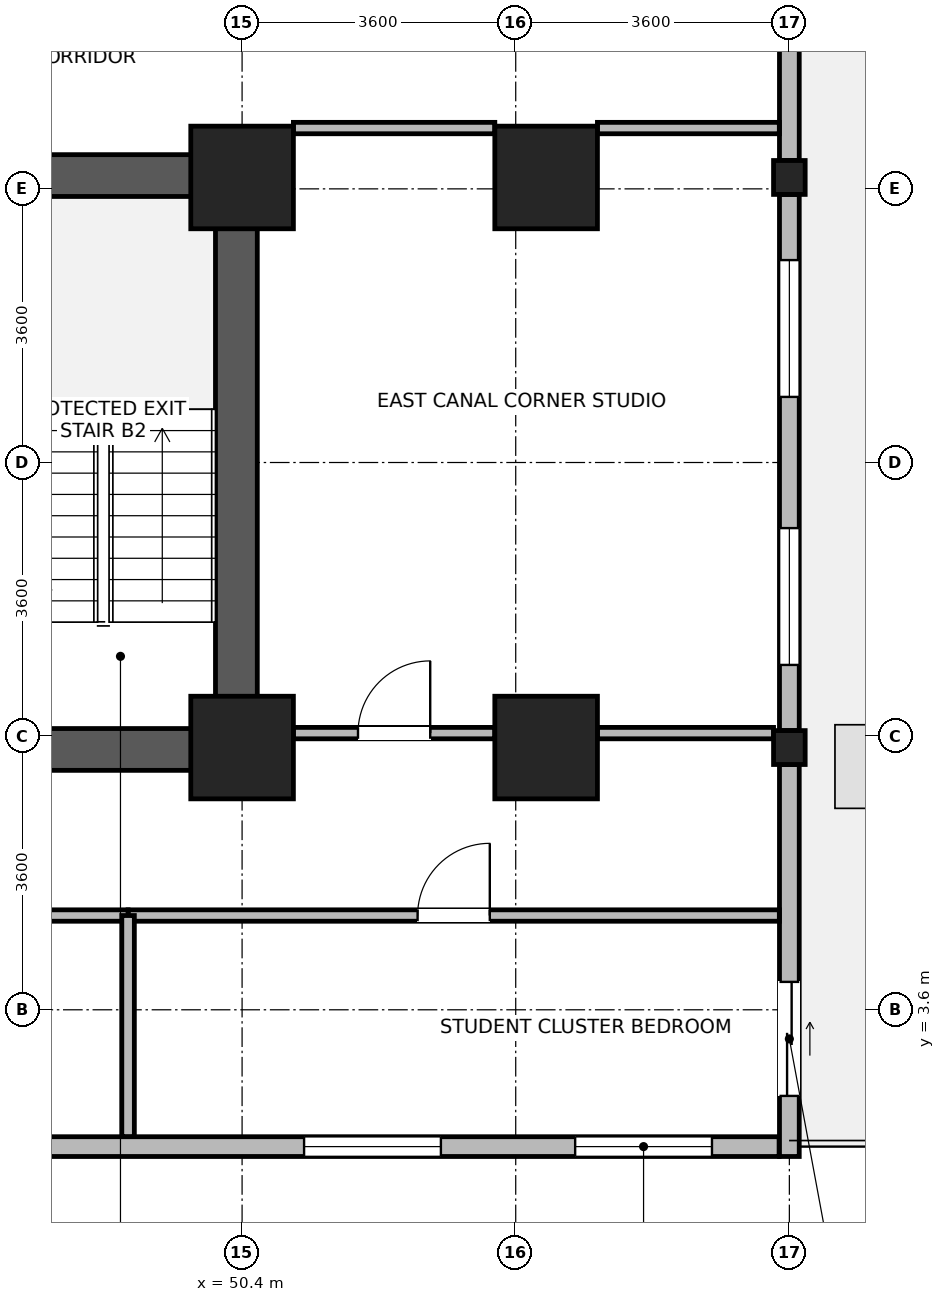
"""IFC4 building model, lengths in metres.
Left out: names, types, materials, properties, quantities, classifications, styles, units other than length and angle.
Written with IfcOpenShell. Run it as: python <this file> out.ifc"""

import sys

from ifc_helpers import new_model, si_unit, direction, frame, frame_2d, origin, origin_2d, place, context, subcontext, project, spatial, rectangle, i_section, extrude, source, transform, mapped, element, fill, save


model = new_model("IFC4")
c1 = context("Model", 3, precision=1e-05, world=origin(), true_north=direction((0.0, 1.0)))
c2 = subcontext(c1, "Body", "Model", "MODEL_VIEW")
j1 = project(units=[si_unit("LENGTHUNIT", "METRE"), si_unit("PLANEANGLEUNIT", "RADIAN")], contexts=[c1])
p1 = place(None, origin())
s1 = spatial("IfcSite", under=j1, at=p1, CompositionType="ELEMENT")
p2 = place(p1, origin())
s2 = spatial("IfcBuilding", under=s1, at=p2, CompositionType="ELEMENT")
p3 = place(p2, frame((0.0, 0.0, 36.4)))
s3 = spatial("IfcBuildingStorey", under=s2, at=p3, CompositionType="ELEMENT", Elevation=36.4)
p4 = place(p3, frame((50.325, 6.75, 0.0), z_axis=(0.0, 0.0, 1.0), x_axis=(0.0, 1.0, 0.0)))
e1 = element("IfcWall", 1, at=p4, inside=s3, PredefinedType="SHEAR", context=c2, shape_type="SweptSolid", body=[
    extrude(rectangle(XDim=8.1, YDim=0.55, at=frame_2d((4.05, 0.0))), origin(), (0.0, 0.0, 1.0), 3.45),
])
for number, where, z_axis, x_axis in (
    (2, (46.85, 7.025, 0.0), (0.0, 0.0, 1.0), (1.0, 0.0, 0.0)),
    (3, (46.85, 14.575, 0.0), (0.0, 0.0, 1.0), (1.0, 0.0, 0.0)),
):
    element("IfcWall", number, at=place(p3, frame(where, z_axis=z_axis, x_axis=x_axis)), inside=s3, PredefinedType="SHEAR", context=c2, shape_type="SweptSolid", body=[
        extrude(rectangle(XDim=3.2, YDim=0.55, at=frame_2d((1.6, 0.0))), origin(), (0.0, 0.0, 1.0), 3.45),
    ])
m1 = source(origin(), c2, "Body", "SweptSolid", [
    extrude(rectangle(XDim=1.35, YDim=1.35, at=origin_2d()), origin(), (0.0, 0.0, 1.0), 3.7),
])
for number, where, z_axis, x_axis in (
    (4, (50.4, 7.05, 0.0), (0.0, 0.0, 1.0), (1.0, 0.0, 0.0)),
    (5, (50.4, 14.55, 0.0), (0.0, 0.0, 1.0), (1.0, 0.0, 0.0)),
    (6, (54.4, 7.05, 0.0), (0.0, 0.0, 1.0), (1.0, 0.0, 0.0)),
    (7, (54.4, 14.55, 0.0), (0.0, 0.0, 1.0), (1.0, 0.0, 0.0)),
):
    element("IfcColumn", number, at=place(p3, frame(where, z_axis=z_axis, x_axis=x_axis)), inside=s3, PredefinedType="COLUMN", context=c2, shape_type="MappedRepresentation", body=[
        mapped(m1, transform((0.0, 0.0, 0.0), x_axis=(1.0, 0.0, 0.0), y_axis=(0.0, 1.0, 0.0), z_axis=(0.0, 0.0, 1.0), scale=1.0)),
    ])
m2 = source(origin(), c2, "Body", "SweptSolid", [
    extrude(i_section(OverallWidth=0.416, OverallDepth=0.446, WebThickness=0.029, FlangeThickness=0.04, FilletRadius=0.015, at=origin_2d()), origin(), (0.0, 0.0, 1.0), 3.7),
])
for number, where, z_axis, x_axis in (
    (8, (57.6, 7.05, 0.0), (0.0, 0.0, 1.0), (1.0, 0.0, 0.0)),
    (9, (57.6, 14.55, 0.0), (0.0, 0.0, 1.0), (1.0, 0.0, 0.0)),
):
    element("IfcColumn", number, at=place(p3, frame(where, z_axis=z_axis, x_axis=x_axis)), inside=s3, PredefinedType="COLUMN", context=c2, shape_type="MappedRepresentation", body=[
        mapped(m2, transform((0.0, 0.0, 0.0), x_axis=(1.0, 0.0, 0.0), y_axis=(0.0, 1.0, 0.0), z_axis=(0.0, 0.0, 1.0), scale=1.0)),
    ])
p5 = place(p3, frame((57.465, 1.8, 0.0), z_axis=(0.0, 0.0, 1.0), x_axis=(-1.0, 0.0, 0.0)))
e10 = element("IfcWall", 10, at=p5, inside=s3, PredefinedType="STANDARD", context=c2, shape_type="SweptSolid", body=[
    extrude(rectangle(XDim=28.53, YDim=0.26, at=frame_2d((14.265, 0.0))), origin(), (0.0, 0.0, 1.0), 3.43),
])
p6 = place(p5, frame((0.883, 0.0, 0.85)))
e11 = element("IfcOpeningElement", 11, at=p6, cuts=e10, PredefinedType="OPENING", context=c2, shape_type="SweptSolid", body=[
    extrude(rectangle(XDim=1.8, YDim=1.85, at=frame_2d((0.9, 0.925))), frame((0.0, 0.14, 0.0), z_axis=(0.0, -1.0, 0.0), x_axis=(1.0, 0.0, 0.0)), (0.0, 0.0, 1.0), 0.28),
])
p7 = place(p5, frame((4.449, 0.0, 0.85)))
e12 = element("IfcOpeningElement", 12, at=p7, cuts=e10, PredefinedType="OPENING", context=c2, shape_type="SweptSolid", body=[
    extrude(rectangle(XDim=1.8, YDim=1.85, at=frame_2d((0.9, 0.925))), frame((0.0, 0.14, 0.0), z_axis=(0.0, -1.0, 0.0), x_axis=(1.0, 0.0, 0.0)), (0.0, 0.0, 1.0), 0.28),
])
p8 = place(p5, frame((11.582, 0.0, 0.85)))
e13 = element("IfcOpeningElement", 13, at=p8, cuts=e10, PredefinedType="OPENING", context=c2, shape_type="SweptSolid", body=[
    extrude(rectangle(XDim=1.8, YDim=1.85, at=frame_2d((0.9, 0.925))), frame((0.0, 0.14, 0.0), z_axis=(0.0, -1.0, 0.0), x_axis=(1.0, 0.0, 0.0)), (0.0, 0.0, 1.0), 0.28),
])
p9 = place(p5, frame((18.714, 0.0, 0.85)))
e14 = element("IfcOpeningElement", 14, at=p9, cuts=e10, PredefinedType="OPENING", context=c2, shape_type="SweptSolid", body=[
    extrude(rectangle(XDim=1.8, YDim=1.85, at=frame_2d((0.9, 0.925))), frame((0.0, 0.14, 0.0), z_axis=(0.0, -1.0, 0.0), x_axis=(1.0, 0.0, 0.0)), (0.0, 0.0, 1.0), 0.28),
])
p10 = place(p5, frame((22.281, 0.0, 0.85)))
e15 = element("IfcOpeningElement", 15, at=p10, cuts=e10, PredefinedType="OPENING", context=c2, shape_type="SweptSolid", body=[
    extrude(rectangle(XDim=1.8, YDim=1.85, at=frame_2d((0.9, 0.925))), frame((0.0, 0.14, 0.0), z_axis=(0.0, -1.0, 0.0), x_axis=(1.0, 0.0, 0.0)), (0.0, 0.0, 1.0), 0.28),
])
p11 = place(p5, frame((25.847, 0.0, 0.85)))
e16 = element("IfcOpeningElement", 16, at=p11, cuts=e10, PredefinedType="OPENING", context=c2, shape_type="SweptSolid", body=[
    extrude(rectangle(XDim=1.8, YDim=1.85, at=frame_2d((0.9, 0.925))), frame((0.0, 0.14, 0.0), z_axis=(0.0, -1.0, 0.0), x_axis=(1.0, 0.0, 0.0)), (0.0, 0.0, 1.0), 0.28),
])
p12 = place(p3, frame((57.6, 6.826, 0.0), z_axis=(0.0, 0.0, 1.0), x_axis=(0.0, -1.0, 0.0)))
e17 = element("IfcWall", 17, at=p12, inside=s3, PredefinedType="STANDARD", context=c2, shape_type="SweptSolid", body=[
    extrude(rectangle(XDim=5.156, YDim=0.26, at=frame_2d((2.578, 0.0))), origin(), (0.0, 0.0, 1.0), 3.43),
])
p13 = place(p12, frame((2.859, 0.0, 0.0)))
e18 = element("IfcOpeningElement", 18, at=p13, cuts=e17, PredefinedType="OPENING", context=c2, shape_type="SweptSolid", body=[
    extrude(rectangle(XDim=1.5, YDim=2.15, at=frame_2d((0.75, 1.075))), frame((0.0, 0.14, 0.0), z_axis=(0.0, -1.0, 0.0), x_axis=(1.0, 0.0, 0.0)), (0.0, 0.0, 1.0), 0.28),
])
p14 = place(p3, frame((57.6, 14.326, 0.0), z_axis=(0.0, 0.0, 1.0), x_axis=(0.0, -1.0, 0.0)))
e19 = element("IfcWall", 19, at=p14, inside=s3, PredefinedType="STANDARD", context=c2, shape_type="SweptSolid", body=[
    extrude(rectangle(XDim=7.052, YDim=0.26, at=frame_2d((3.526, 0.0))), origin(), (0.0, 0.0, 1.0), 2.93),
])
p15 = place(p14, frame((0.863, 0.0, 0.85)))
e20 = element("IfcOpeningElement", 20, at=p15, cuts=e19, PredefinedType="OPENING", context=c2, shape_type="SweptSolid", body=[
    extrude(rectangle(XDim=1.8, YDim=1.85, at=frame_2d((0.9, 0.925))), frame((0.0, 0.14, 0.0), z_axis=(0.0, -1.0, 0.0), x_axis=(1.0, 0.0, 0.0)), (0.0, 0.0, 1.0), 0.28),
])
p16 = place(p14, frame((4.389, 0.0, 0.85)))
e21 = element("IfcOpeningElement", 21, at=p16, cuts=e19, PredefinedType="OPENING", context=c2, shape_type="SweptSolid", body=[
    extrude(rectangle(XDim=1.8, YDim=1.85, at=frame_2d((0.9, 0.925))), frame((0.0, 0.14, 0.0), z_axis=(0.0, -1.0, 0.0), x_axis=(1.0, 0.0, 0.0)), (0.0, 0.0, 1.0), 0.28),
])
p17 = place(p3, frame((57.6, 21.376, 0.0), z_axis=(0.0, 0.0, 1.0), x_axis=(0.0, -1.0, 0.0)))
e22 = element("IfcWall", 22, at=p17, inside=s3, PredefinedType="STANDARD", context=c2, shape_type="SweptSolid", body=[
    extrude(rectangle(XDim=6.602, YDim=0.26, at=frame_2d((3.301, 0.0))), origin(), (0.0, 0.0, 1.0), 2.93),
])
p18 = place(p17, frame((0.75, 0.0, 0.85)))
e23 = element("IfcOpeningElement", 23, at=p18, cuts=e22, PredefinedType="OPENING", context=c2, shape_type="SweptSolid", body=[
    extrude(rectangle(XDim=1.8, YDim=1.85, at=frame_2d((0.9, 0.925))), frame((0.0, 0.14, 0.0), z_axis=(0.0, -1.0, 0.0), x_axis=(1.0, 0.0, 0.0)), (0.0, 0.0, 1.0), 0.28),
])
p19 = place(p3, frame((48.9, 4.84, 0.0), z_axis=(0.0, 0.0, 1.0), x_axis=(1.0, 0.0, 0.0)))
e24 = element("IfcWall", 24, at=p19, inside=s3, PredefinedType="PARTITIONING", context=c2, shape_type="SweptSolid", body=[
    extrude(rectangle(XDim=8.568, YDim=0.15, at=frame_2d((4.284, 0.0))), origin(), (0.0, 0.0, 1.0), 3.43),
])
p20 = place(p19, frame((3.809, 0.0, 0.0)))
e25 = element("IfcOpeningElement", 25, at=p20, cuts=e24, PredefinedType="OPENING", context=c2, shape_type="SweptSolid", body=[
    extrude(rectangle(XDim=0.95, YDim=2.1, at=frame_2d((0.475, 1.05))), frame((0.0, 0.085, 0.0), z_axis=(0.0, -1.0, 0.0), x_axis=(1.0, 0.0, 0.0)), (0.0, 0.0, 1.0), 0.17),
])
p21 = place(p3, frame((40.78, 4.84, 0.0), z_axis=(0.0, 0.0, 1.0), x_axis=(1.0, 0.0, 0.0)))
e26 = element("IfcWall", 26, at=p21, inside=s3, PredefinedType="PARTITIONING", context=c2, shape_type="SweptSolid", body=[
    extrude(rectangle(XDim=8.12, YDim=0.15, at=frame_2d((4.06, 0.0))), origin(), (0.0, 0.0, 1.0), 3.43),
])
p22 = place(p21, frame((3.585, 0.0, 0.0)))
e27 = element("IfcOpeningElement", 27, at=p22, cuts=e26, PredefinedType="OPENING", context=c2, shape_type="SweptSolid", body=[
    extrude(rectangle(XDim=0.95, YDim=2.1, at=frame_2d((0.475, 1.05))), frame((0.0, 0.085, 0.0), z_axis=(0.0, -1.0, 0.0), x_axis=(1.0, 0.0, 0.0)), (0.0, 0.0, 1.0), 0.17),
])
p23 = place(p3, frame((51.075, 7.24, 0.0), z_axis=(0.0, 0.0, 1.0), x_axis=(1.0, 0.0, 0.0)))
e28 = element("IfcWall", 28, at=p23, inside=s3, PredefinedType="PARTITIONING", context=c2, shape_type="SweptSolid", body=[
    extrude(rectangle(XDim=2.65, YDim=0.15, at=frame_2d((1.325, 0.0))), origin(), (0.0, 0.0, 1.0), 2.78),
])
p24 = place(p23, frame((0.85, 0.0, 0.0)))
e29 = element("IfcOpeningElement", 29, at=p24, cuts=e28, PredefinedType="OPENING", context=c2, shape_type="SweptSolid", body=[
    extrude(rectangle(XDim=0.95, YDim=2.1, at=frame_2d((0.475, 1.05))), frame((0.0, 0.085, 0.0), z_axis=(0.0, -1.0, 0.0), x_axis=(1.0, 0.0, 0.0)), (0.0, 0.0, 1.0), 0.17),
])
p25 = place(p3, frame((55.075, 7.24, 0.0), z_axis=(0.0, 0.0, 1.0), x_axis=(1.0, 0.0, 0.0)))
e30 = element("IfcWall", 30, at=p25, inside=s3, PredefinedType="PARTITIONING", context=c2, shape_type="SweptSolid", body=[
    extrude(rectangle(XDim=2.317, YDim=0.15, at=frame_2d((1.159, 0.0))), origin(), (0.0, 0.0, 1.0), 2.78),
])
p26 = place(p3, frame((51.075, 15.2, 0.0), z_axis=(0.0, 0.0, 1.0), x_axis=(1.0, 0.0, 0.0)))
e31 = element("IfcWall", 31, at=p26, inside=s3, PredefinedType="PARTITIONING", context=c2, shape_type="SweptSolid", body=[
    extrude(rectangle(XDim=2.65, YDim=0.15, at=frame_2d((1.325, 0.0))), origin(), (0.0, 0.0, 1.0), 3.43),
])
p27 = place(p3, frame((55.075, 15.2, 0.0), z_axis=(0.0, 0.0, 1.0), x_axis=(1.0, 0.0, 0.0)))
e32 = element("IfcWall", 32, at=p27, inside=s3, PredefinedType="PARTITIONING", context=c2, shape_type="SweptSolid", body=[
    extrude(rectangle(XDim=2.393, YDim=0.15, at=frame_2d((1.197, 0.0))), origin(), (0.0, 0.0, 1.0), 3.43),
])
p28 = place(p3, frame((48.9, 1.932, 0.0), z_axis=(0.0, 0.0, 1.0), x_axis=(0.0, 1.0, 0.0)))
e33 = element("IfcWall", 33, at=p28, inside=s3, PredefinedType="PARTITIONING", context=c2, shape_type="SweptSolid", body=[
    extrude(rectangle(XDim=2.908, YDim=0.165, at=frame_2d((1.454, 0.0))), origin(), (0.0, 0.0, 1.0), 3.43),
])
p29 = place(p6, origin())
e34 = element("IfcWindow", 34, at=p29, inside=s3, PartitioningType="SINGLE_PANEL", PredefinedType="WINDOW", context=c2, shape_type="SweptSolid", body=[
    extrude(rectangle(XDim=1.8, YDim=1.85, at=frame_2d((0.9, 0.925))), frame((0.0, 0.03, 0.0), z_axis=(0.0, -1.0, 0.0), x_axis=(1.0, 0.0, 0.0)), (0.0, 0.0, 1.0), 0.06),
])
fill(e11, e34)
p30 = place(p7, origin())
e35 = element("IfcWindow", 35, at=p30, inside=s3, PartitioningType="SINGLE_PANEL", PredefinedType="WINDOW", context=c2, shape_type="SweptSolid", body=[
    extrude(rectangle(XDim=1.8, YDim=1.85, at=frame_2d((0.9, 0.925))), frame((0.0, 0.03, 0.0), z_axis=(0.0, -1.0, 0.0), x_axis=(1.0, 0.0, 0.0)), (0.0, 0.0, 1.0), 0.06),
])
fill(e12, e35)
p31 = place(p13, origin())
e36 = element("IfcDoor", 36, at=p31, inside=s3, OperationType="SLIDING_TO_LEFT", PredefinedType="DOOR", context=c2, shape_type="SweptSolid", body=[
    extrude(rectangle(XDim=1.5, YDim=2.15, at=frame_2d((0.75, 1.075))), frame((0.0, 0.025, 0.0), z_axis=(0.0, -1.0, 0.0), x_axis=(1.0, 0.0, 0.0)), (0.0, 0.0, 1.0), 0.05),
])
fill(e18, e36)
p32 = place(p15, origin())
e37 = element("IfcWindow", 37, at=p32, inside=s3, PartitioningType="SINGLE_PANEL", PredefinedType="WINDOW", context=c2, shape_type="SweptSolid", body=[
    extrude(rectangle(XDim=1.8, YDim=1.85, at=frame_2d((0.9, 0.925))), frame((0.0, 0.03, 0.0), z_axis=(0.0, -1.0, 0.0), x_axis=(1.0, 0.0, 0.0)), (0.0, 0.0, 1.0), 0.06),
])
fill(e20, e37)
p33 = place(p16, origin())
e38 = element("IfcWindow", 38, at=p33, inside=s3, PartitioningType="SINGLE_PANEL", PredefinedType="WINDOW", context=c2, shape_type="SweptSolid", body=[
    extrude(rectangle(XDim=1.8, YDim=1.85, at=frame_2d((0.9, 0.925))), frame((0.0, 0.03, 0.0), z_axis=(0.0, -1.0, 0.0), x_axis=(1.0, 0.0, 0.0)), (0.0, 0.0, 1.0), 0.06),
])
fill(e21, e38)
p34 = place(p20, origin())
e39 = element("IfcDoor", 39, at=p34, inside=s3, OperationType="SINGLE_SWING_RIGHT", PredefinedType="DOOR", context=c2, shape_type="SweptSolid", body=[
    extrude(rectangle(XDim=0.95, YDim=2.1, at=frame_2d((0.475, 1.05))), frame((0.0, 0.025, 0.0), z_axis=(0.0, -1.0, 0.0), x_axis=(1.0, 0.0, 0.0)), (0.0, 0.0, 1.0), 0.05),
])
fill(e25, e39)
p35 = place(p24, origin())
e40 = element("IfcDoor", 40, at=p35, inside=s3, OperationType="SINGLE_SWING_RIGHT", PredefinedType="DOOR", context=c2, shape_type="SweptSolid", body=[
    extrude(rectangle(XDim=0.95, YDim=2.1, at=frame_2d((0.475, 1.05))), frame((0.0, 0.025, 0.0), z_axis=(0.0, -1.0, 0.0), x_axis=(1.0, 0.0, 0.0)), (0.0, 0.0, 1.0), 0.05),
])
fill(e29, e40)
save(model, sys.argv[1])
